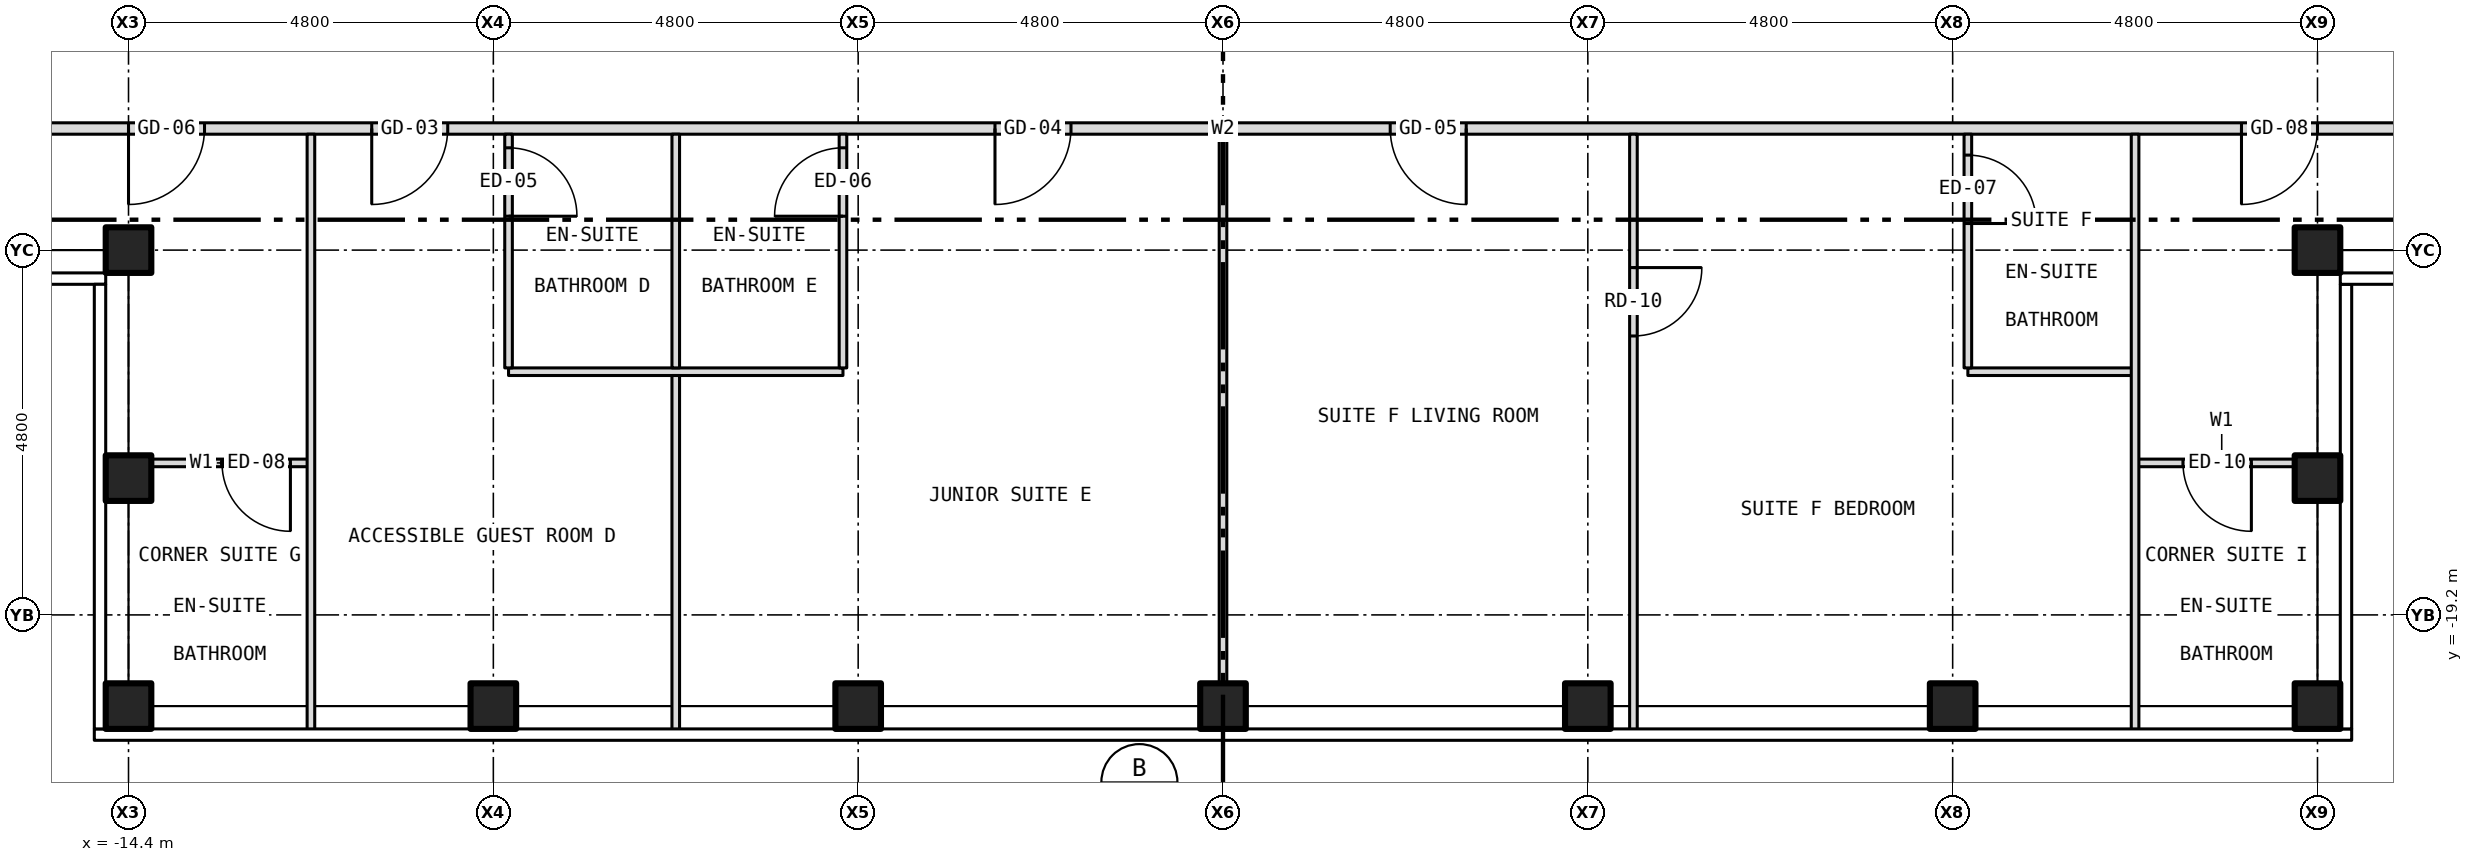
"""IFC4 building model, lengths in metres.
Left out: names, types, materials, properties, quantities, classifications, styles, units other than length and angle.
Written with IfcOpenShell. Run it as: python <this file> out.ifc"""

import sys

from ifc_helpers import new_model, si_unit, direction, frame, frame_2d, origin, origin_2d, place, context, subcontext, project, spatial, rectangle, hollow_rectangle, extrude, element, fill, save


model = new_model("IFC4")
c1 = context("Model", 3, precision=1e-05, world=origin(), true_north=direction((0.0, 1.0)))
c2 = subcontext(c1, "Body", "Model", "MODEL_VIEW")
j1 = project(units=[si_unit("LENGTHUNIT", "METRE"), si_unit("PLANEANGLEUNIT", "RADIAN")], contexts=[c1])
p1 = place(None, origin())
s1 = spatial("IfcSite", under=j1, at=p1, CompositionType="ELEMENT")
p2 = place(p1, origin())
s2 = spatial("IfcBuilding", under=s1, at=p2, CompositionType="ELEMENT")
p3 = place(p2, frame((0.0, 0.0, 248.0)))
s3 = spatial("IfcBuildingStorey", under=s2, at=p3, CompositionType="ELEMENT", Elevation=248.0)
for number, where, z_axis, x_axis in (
    (1, (-14.4, -20.4, -0.15), (0.0, 0.0, 1.0), (1.0, 0.0, 0.0)),
    (2, (-9.6, -20.4, -0.15), (0.0, 0.0, 1.0), (1.0, 0.0, 0.0)),
    (3, (-4.8, -20.4, -0.15), (0.0, 0.0, 1.0), (1.0, 0.0, 0.0)),
    (4, (0.0, -20.4, -0.15), (0.0, 0.0, 1.0), (1.0, 0.0, 0.0)),
    (5, (4.8, -20.4, -0.15), (0.0, 0.0, 1.0), (1.0, 0.0, 0.0)),
    (6, (9.6, -20.4, -0.15), (0.0, 0.0, 1.0), (1.0, 0.0, 0.0)),
    (7, (14.4, -20.4, -0.15), (0.0, 0.0, 1.0), (1.0, 0.0, 0.0)),
    (8, (-14.4, -14.4, -0.15), (0.0, 0.0, 1.0), (1.0, 0.0, 0.0)),
    (9, (-14.4, -17.4, -0.15), (0.0, 0.0, 1.0), (1.0, 0.0, 0.0)),
    (10, (14.4, -14.4, -0.15), (0.0, 0.0, 1.0), (1.0, 0.0, 0.0)),
    (11, (14.4, -17.4, -0.15), (0.0, 0.0, 1.0), (1.0, 0.0, 0.0)),
):
    element("IfcColumn", number, at=place(p3, frame(where, z_axis=z_axis, x_axis=x_axis)), inside=s3, PredefinedType="COLUMN", context=c2, shape_type="SweptSolid", body=[
        extrude(hollow_rectangle(XDim=0.6, YDim=0.6, WallThickness=0.03, at=origin_2d()), origin(), (0.0, 0.0, 1.0), 3.5),
    ])
p4 = place(p3, frame((-14.28, -17.2, 0.0), z_axis=(0.0, 0.0, 1.0), x_axis=(1.0, 0.0, 0.0)))
e12 = element("IfcWall", 12, at=p4, inside=s3, PredefinedType="PARTITIONING", context=c2, shape_type="SweptSolid", body=[
    extrude(rectangle(XDim=2.28, YDim=0.1, at=frame_2d((1.14, 0.0))), origin(), (0.0, 0.0, 1.0), 3.35),
])
p5 = place(p4, frame((1.11, 0.0, 0.0)))
e13 = element("IfcOpeningElement", 13, at=p5, cuts=e12, PredefinedType="OPENING", context=c2, shape_type="SweptSolid", body=[
    extrude(rectangle(XDim=0.9, YDim=2.1, at=frame_2d((0.45, 1.05))), frame((0.0, 0.062, 0.0), z_axis=(0.0, -1.0, 0.0), x_axis=(1.0, 0.0, 0.0)), (0.0, 0.0, 1.0), 0.124),
])
p6 = place(p3, frame((12.0, -17.2, 0.0), z_axis=(0.0, 0.0, 1.0), x_axis=(1.0, 0.0, 0.0)))
e14 = element("IfcWall", 14, at=p6, inside=s3, PredefinedType="PARTITIONING", context=c2, shape_type="SweptSolid", body=[
    extrude(rectangle(XDim=2.28, YDim=0.1, at=frame_2d((1.14, 0.0))), origin(), (0.0, 0.0, 1.0), 3.35),
])
p7 = place(p6, frame((0.63, 0.0, 0.0)))
e15 = element("IfcOpeningElement", 15, at=p7, cuts=e14, PredefinedType="OPENING", context=c2, shape_type="SweptSolid", body=[
    extrude(rectangle(XDim=0.9, YDim=2.1, at=frame_2d((0.45, 1.05))), frame((0.0, 0.062, 0.0), z_axis=(0.0, -1.0, 0.0), x_axis=(1.0, 0.0, 0.0)), (0.0, 0.0, 1.0), 0.124),
])
p8 = place(p3, frame((-9.4, -16.0, 0.0), z_axis=(0.0, 0.0, 1.0), x_axis=(1.0, 0.0, 0.0)))
e16 = element("IfcWall", 16, at=p8, inside=s3, PredefinedType="PARTITIONING", context=c2, shape_type="SweptSolid", body=[
    extrude(rectangle(XDim=4.4, YDim=0.1, at=frame_2d((2.2, 0.0))), origin(), (0.0, 0.0, 1.0), 3.35),
])
p9 = place(p3, frame((9.8, -16.0, 0.0), z_axis=(0.0, 0.0, 1.0), x_axis=(1.0, 0.0, 0.0)))
e17 = element("IfcWall", 17, at=p9, inside=s3, PredefinedType="PARTITIONING", context=c2, shape_type="SweptSolid", body=[
    extrude(rectangle(XDim=2.2, YDim=0.1, at=frame_2d((1.1, 0.0))), origin(), (0.0, 0.0, 1.0), 3.35),
])
p10 = place(p3, frame((-15.8, -12.8, 0.0), z_axis=(0.0, 0.0, 1.0), x_axis=(1.0, 0.0, 0.0)))
e18 = element("IfcWall", 18, at=p10, inside=s3, PredefinedType="PARTITIONING", context=c2, shape_type="SweptSolid", body=[
    extrude(rectangle(XDim=31.6, YDim=0.15, at=frame_2d((15.8, 0.0))), origin(), (0.0, 0.0, 1.0), 3.35),
])
p11 = place(p10, frame((4.6, 0.0, 0.0)))
e19 = element("IfcOpeningElement", 19, at=p11, cuts=e18, PredefinedType="OPENING", context=c2, shape_type="SweptSolid", body=[
    extrude(rectangle(XDim=1.0, YDim=2.1, at=frame_2d((0.5, 1.05))), frame((0.0, 0.087, 0.0), z_axis=(0.0, -1.0, 0.0), x_axis=(1.0, 0.0, 0.0)), (0.0, 0.0, 1.0), 0.174),
])
p12 = place(p10, frame((12.8, 0.0, 0.0)))
e20 = element("IfcOpeningElement", 20, at=p12, cuts=e18, PredefinedType="OPENING", context=c2, shape_type="SweptSolid", body=[
    extrude(rectangle(XDim=1.0, YDim=2.1, at=frame_2d((0.5, 1.05))), frame((0.0, 0.087, 0.0), z_axis=(0.0, -1.0, 0.0), x_axis=(1.0, 0.0, 0.0)), (0.0, 0.0, 1.0), 0.174),
])
p13 = place(p10, frame((18.0, 0.0, 0.0)))
e21 = element("IfcOpeningElement", 21, at=p13, cuts=e18, PredefinedType="OPENING", context=c2, shape_type="SweptSolid", body=[
    extrude(rectangle(XDim=1.0, YDim=2.1, at=frame_2d((0.5, 1.05))), frame((0.0, 0.087, 0.0), z_axis=(0.0, -1.0, 0.0), x_axis=(1.0, 0.0, 0.0)), (0.0, 0.0, 1.0), 0.174),
])
p14 = place(p10, frame((1.4, 0.0, 0.0)))
e22 = element("IfcOpeningElement", 22, at=p14, cuts=e18, PredefinedType="OPENING", context=c2, shape_type="SweptSolid", body=[
    extrude(rectangle(XDim=1.0, YDim=2.1, at=frame_2d((0.5, 1.05))), frame((0.0, 0.087, 0.0), z_axis=(0.0, -1.0, 0.0), x_axis=(1.0, 0.0, 0.0)), (0.0, 0.0, 1.0), 0.174),
])
p15 = place(p10, frame((29.2, 0.0, 0.0)))
e23 = element("IfcOpeningElement", 23, at=p15, cuts=e18, PredefinedType="OPENING", context=c2, shape_type="SweptSolid", body=[
    extrude(rectangle(XDim=1.0, YDim=2.1, at=frame_2d((0.5, 1.05))), frame((0.0, 0.087, 0.0), z_axis=(0.0, -1.0, 0.0), x_axis=(1.0, 0.0, 0.0)), (0.0, 0.0, 1.0), 0.174),
])
p16 = place(p3, frame((-12.0, -20.73, 0.0), z_axis=(0.0, 0.0, 1.0), x_axis=(0.0, 1.0, 0.0)))
e24 = element("IfcWall", 24, at=p16, inside=s3, PredefinedType="PARTITIONING", context=c2, shape_type="SweptSolid", body=[
    extrude(rectangle(XDim=7.855, YDim=0.1, at=frame_2d((3.927, 0.0))), origin(), (0.0, 0.0, 1.0), 3.35),
])
p17 = place(p3, frame((-9.4, -15.95, 0.0), z_axis=(0.0, 0.0, 1.0), x_axis=(0.0, 1.0, 0.0)))
e25 = element("IfcWall", 25, at=p17, inside=s3, PredefinedType="PARTITIONING", context=c2, shape_type="SweptSolid", body=[
    extrude(rectangle(XDim=3.075, YDim=0.1, at=frame_2d((1.538, 0.0))), origin(), (0.0, 0.0, 1.0), 2.728),
])
p18 = place(p17, frame((1.996, 0.0, 0.0)))
e26 = element("IfcOpeningElement", 26, at=p18, cuts=e25, PredefinedType="OPENING", context=c2, shape_type="SweptSolid", body=[
    extrude(rectangle(XDim=0.9, YDim=2.1, at=frame_2d((0.45, 1.05))), frame((0.0, 0.062, 0.0), z_axis=(0.0, -1.0, 0.0), x_axis=(1.0, 0.0, 0.0)), (0.0, 0.0, 1.0), 0.124),
])
p19 = place(p3, frame((-7.2, -20.73, 0.0), z_axis=(0.0, 0.0, 1.0), x_axis=(0.0, 1.0, 0.0)))
e27 = element("IfcWall", 27, at=p19, inside=s3, PredefinedType="PARTITIONING", context=c2, shape_type="SweptSolid", body=[
    extrude(rectangle(XDim=4.68, YDim=0.1, at=frame_2d((2.34, 0.0))), origin(), (0.0, 0.0, 1.0), 3.35),
])
p20 = place(p3, frame((-7.2, -15.95, 0.0), z_axis=(0.0, 0.0, 1.0), x_axis=(0.0, 1.0, 0.0)))
e28 = element("IfcWall", 28, at=p20, inside=s3, PredefinedType="PARTITIONING", context=c2, shape_type="SweptSolid", body=[
    extrude(rectangle(XDim=3.075, YDim=0.1, at=frame_2d((1.538, 0.0))), origin(), (0.0, 0.0, 1.0), 3.35),
])
p21 = place(p3, frame((-5.0, -15.95, 0.0), z_axis=(0.0, 0.0, 1.0), x_axis=(0.0, 1.0, 0.0)))
e29 = element("IfcWall", 29, at=p21, inside=s3, PredefinedType="PARTITIONING", context=c2, shape_type="SweptSolid", body=[
    extrude(rectangle(XDim=3.075, YDim=0.1, at=frame_2d((1.538, 0.0))), origin(), (0.0, 0.0, 1.0), 3.35),
])
p22 = place(p21, frame((1.996, 0.0, 0.0)))
e30 = element("IfcOpeningElement", 30, at=p22, cuts=e29, PredefinedType="OPENING", context=c2, shape_type="SweptSolid", body=[
    extrude(rectangle(XDim=0.9, YDim=2.1, at=frame_2d((0.45, 1.05))), frame((0.0, 0.062, 0.0), z_axis=(0.0, -1.0, 0.0), x_axis=(1.0, 0.0, 0.0)), (0.0, 0.0, 1.0), 0.124),
])
p23 = place(p3, frame((0.0, -20.28, 0.0), z_axis=(0.0, 0.0, 1.0), x_axis=(0.0, 1.0, 0.0)))
e31 = element("IfcWall", 31, at=p23, inside=s3, PredefinedType="PARTITIONING", context=c2, shape_type="SweptSolid", body=[
    extrude(rectangle(XDim=7.405, YDim=0.1, at=frame_2d((3.703, 0.0))), origin(), (0.0, 0.0, 1.0), 2.728),
])
p24 = place(p3, frame((5.4, -20.73, 0.0), z_axis=(0.0, 0.0, 1.0), x_axis=(0.0, 1.0, 0.0)))
e32 = element("IfcWall", 32, at=p24, inside=s3, PredefinedType="PARTITIONING", context=c2, shape_type="SweptSolid", body=[
    extrude(rectangle(XDim=7.855, YDim=0.1, at=frame_2d((3.927, 0.0))), origin(), (0.0, 0.0, 1.0), 3.35),
])
p25 = place(p24, frame((5.2, 0.0, 0.0)))
e33 = element("IfcOpeningElement", 33, at=p25, cuts=e32, PredefinedType="OPENING", context=c2, shape_type="SweptSolid", body=[
    extrude(rectangle(XDim=0.9, YDim=2.1, at=frame_2d((0.45, 1.05))), frame((0.0, 0.062, 0.0), z_axis=(0.0, -1.0, 0.0), x_axis=(1.0, 0.0, 0.0)), (0.0, 0.0, 1.0), 0.124),
])
p26 = place(p3, frame((9.8, -15.95, 0.0), z_axis=(0.0, 0.0, 1.0), x_axis=(0.0, 1.0, 0.0)))
e34 = element("IfcWall", 34, at=p26, inside=s3, PredefinedType="PARTITIONING", context=c2, shape_type="SweptSolid", body=[
    extrude(rectangle(XDim=3.075, YDim=0.1, at=frame_2d((1.538, 0.0))), origin(), (0.0, 0.0, 1.0), 2.728),
])
p27 = place(p26, frame((1.9, 0.0, 0.0)))
e35 = element("IfcOpeningElement", 35, at=p27, cuts=e34, PredefinedType="OPENING", context=c2, shape_type="SweptSolid", body=[
    extrude(rectangle(XDim=0.9, YDim=2.1, at=frame_2d((0.45, 1.05))), frame((0.0, 0.062, 0.0), z_axis=(0.0, -1.0, 0.0), x_axis=(1.0, 0.0, 0.0)), (0.0, 0.0, 1.0), 0.124),
])
p28 = place(p3, frame((12.0, -20.73, 0.0), z_axis=(0.0, 0.0, 1.0), x_axis=(0.0, 1.0, 0.0)))
e36 = element("IfcWall", 36, at=p28, inside=s3, PredefinedType="PARTITIONING", context=c2, shape_type="SweptSolid", body=[
    extrude(rectangle(XDim=7.855, YDim=0.1, at=frame_2d((3.927, 0.0))), origin(), (0.0, 0.0, 1.0), 3.35),
])
p29 = place(p11, origin())
e37 = element("IfcDoor", 37, at=p29, inside=s3, OperationType="SINGLE_SWING_LEFT", PredefinedType="DOOR", context=c2, shape_type="SweptSolid", body=[
    extrude(rectangle(XDim=1.0, YDim=2.1, at=frame_2d((0.5, 1.05))), frame((0.0, 0.025, 0.0), z_axis=(0.0, -1.0, 0.0), x_axis=(1.0, 0.0, 0.0)), (0.0, 0.0, 1.0), 0.05),
])
fill(e19, e37)
p30 = place(p18, origin())
e38 = element("IfcDoor", 38, at=p30, inside=s3, OperationType="SINGLE_SWING_LEFT", PredefinedType="DOOR", context=c2, shape_type="SweptSolid", body=[
    extrude(rectangle(XDim=0.9, YDim=2.1, at=frame_2d((0.45, 1.05))), frame((0.0, 0.025, 0.0), z_axis=(0.0, -1.0, 0.0), x_axis=(1.0, 0.0, 0.0)), (0.0, 0.0, 1.0), 0.05),
])
fill(e26, e38)
p31 = place(p12, origin())
e39 = element("IfcDoor", 39, at=p31, inside=s3, OperationType="SINGLE_SWING_LEFT", PredefinedType="DOOR", context=c2, shape_type="SweptSolid", body=[
    extrude(rectangle(XDim=1.0, YDim=2.1, at=frame_2d((0.5, 1.05))), frame((0.0, 0.025, 0.0), z_axis=(0.0, -1.0, 0.0), x_axis=(1.0, 0.0, 0.0)), (0.0, 0.0, 1.0), 0.05),
])
fill(e20, e39)
p32 = place(p22, origin())
e40 = element("IfcDoor", 40, at=p32, inside=s3, OperationType="SINGLE_SWING_LEFT", PredefinedType="DOOR", context=c2, shape_type="SweptSolid", body=[
    extrude(rectangle(XDim=0.9, YDim=2.1, at=frame_2d((0.45, 1.05))), frame((0.0, 0.025, 0.0), z_axis=(0.0, -1.0, 0.0), x_axis=(1.0, 0.0, 0.0)), (0.0, 0.0, 1.0), 0.05),
])
fill(e30, e40)
p33 = place(p13, origin())
e41 = element("IfcDoor", 41, at=p33, inside=s3, OperationType="SINGLE_SWING_RIGHT", PredefinedType="DOOR", context=c2, shape_type="SweptSolid", body=[
    extrude(rectangle(XDim=1.0, YDim=2.1, at=frame_2d((0.5, 1.05))), frame((0.0, 0.025, 0.0), z_axis=(0.0, -1.0, 0.0), x_axis=(1.0, 0.0, 0.0)), (0.0, 0.0, 1.0), 0.05),
])
fill(e21, e41)
p34 = place(p25, origin())
e42 = element("IfcDoor", 42, at=p34, inside=s3, OperationType="SINGLE_SWING_RIGHT", PredefinedType="DOOR", context=c2, shape_type="SweptSolid", body=[
    extrude(rectangle(XDim=0.9, YDim=2.1, at=frame_2d((0.45, 1.05))), frame((0.0, 0.025, 0.0), z_axis=(0.0, -1.0, 0.0), x_axis=(1.0, 0.0, 0.0)), (0.0, 0.0, 1.0), 0.05),
])
fill(e33, e42)
p35 = place(p27, origin())
e43 = element("IfcDoor", 43, at=p35, inside=s3, OperationType="SINGLE_SWING_LEFT", PredefinedType="DOOR", context=c2, shape_type="SweptSolid", body=[
    extrude(rectangle(XDim=0.9, YDim=2.1, at=frame_2d((0.45, 1.05))), frame((0.0, 0.025, 0.0), z_axis=(0.0, -1.0, 0.0), x_axis=(1.0, 0.0, 0.0)), (0.0, 0.0, 1.0), 0.05),
])
fill(e35, e43)
p36 = place(p5, origin())
e44 = element("IfcDoor", 44, at=p36, inside=s3, OperationType="SINGLE_SWING_RIGHT", PredefinedType="DOOR", context=c2, shape_type="SweptSolid", body=[
    extrude(rectangle(XDim=0.9, YDim=2.1, at=frame_2d((0.45, 1.05))), frame((0.0, 0.025, 0.0), z_axis=(0.0, -1.0, 0.0), x_axis=(1.0, 0.0, 0.0)), (0.0, 0.0, 1.0), 0.05),
])
fill(e13, e44)
p37 = place(p14, origin())
e45 = element("IfcDoor", 45, at=p37, inside=s3, OperationType="SINGLE_SWING_LEFT", PredefinedType="DOOR", context=c2, shape_type="SweptSolid", body=[
    extrude(rectangle(XDim=1.0, YDim=2.1, at=frame_2d((0.5, 1.05))), frame((0.0, 0.025, 0.0), z_axis=(0.0, -1.0, 0.0), x_axis=(1.0, 0.0, 0.0)), (0.0, 0.0, 1.0), 0.05),
])
fill(e22, e45)
p38 = place(p7, origin())
e46 = element("IfcDoor", 46, at=p38, inside=s3, OperationType="SINGLE_SWING_RIGHT", PredefinedType="DOOR", context=c2, shape_type="SweptSolid", body=[
    extrude(rectangle(XDim=0.9, YDim=2.1, at=frame_2d((0.45, 1.05))), frame((0.0, 0.025, 0.0), z_axis=(0.0, -1.0, 0.0), x_axis=(1.0, 0.0, 0.0)), (0.0, 0.0, 1.0), 0.05),
])
fill(e15, e46)
p39 = place(p15, origin())
e47 = element("IfcDoor", 47, at=p39, inside=s3, OperationType="SINGLE_SWING_LEFT", PredefinedType="DOOR", context=c2, shape_type="SweptSolid", body=[
    extrude(rectangle(XDim=1.0, YDim=2.1, at=frame_2d((0.5, 1.05))), frame((0.0, 0.025, 0.0), z_axis=(0.0, -1.0, 0.0), x_axis=(1.0, 0.0, 0.0)), (0.0, 0.0, 1.0), 0.05),
])
fill(e23, e47)
save(model, sys.argv[1])
